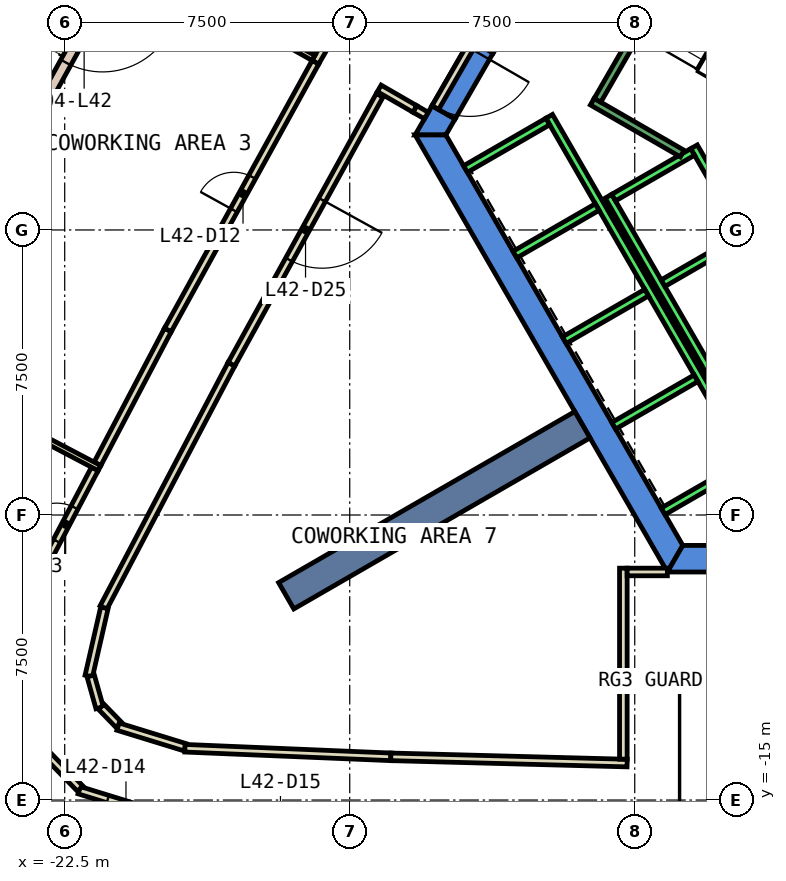
"""IFC4 building model, lengths in metres.
Left out: names, types, materials, properties, quantities, classifications, styles, units other than length and angle.
Written with IfcOpenShell. Run it as: python <this file> out.ifc"""

import sys

from ifc_helpers import new_model, si_unit, direction, frame, frame_2d, origin, place, context, subcontext, project, spatial, polyline, rectangle, outline, extrude, element, fill, save


model = new_model("IFC4")
c1 = context("Model", 3, precision=1e-05, world=origin(), true_north=direction((0.0, 1.0)))
c2 = subcontext(c1, "Body", "Model", "MODEL_VIEW")
j1 = project(units=[si_unit("LENGTHUNIT", "METRE"), si_unit("PLANEANGLEUNIT", "RADIAN")], contexts=[c1])
p1 = place(None, origin())
s1 = spatial("IfcSite", under=j1, at=p1, CompositionType="ELEMENT")
p2 = place(p1, origin())
s2 = spatial("IfcBuilding", under=s1, at=p2, CompositionType="ELEMENT")
p3 = place(p2, frame((0.0, 0.0, 189.8)))
s3 = spatial("IfcBuildingStorey", under=s2, at=p3, CompositionType="ELEMENT", Elevation=189.8)
p4 = place(p3, frame((0.0, 0.0, -0.6)))
e1 = element("IfcWall", 1, at=p4, inside=s3, PredefinedType="SHEAR", context=c2, shape_type="SweptSolid", body=[
    extrude(outline(polyline([(-11.834, 5.002), (-11.228, 4.652), (-6.235, 13.3), (-6.64, 14.0), (-11.834, 5.002)])), origin(), (0.0, 0.0, 1.0), 4.4),
])
p5 = place(p3, frame((0.0, 0.0, -0.6)))
e2 = element("IfcWall", 2, at=p5, inside=s3, PredefinedType="SHEAR", context=c2, shape_type="SweptSolid", body=[
    extrude(outline(polyline([(-12.228, 2.92), (-12.834, 3.27), (-13.279, 2.5), (-12.471, 2.5), (-12.228, 2.92)])), origin(), (0.0, 0.0, 1.0), 4.4),
])
p6 = place(p3, frame((0.0, 0.0, 3.6)))
e3 = element("IfcWall", 3, at=p6, inside=s3, PredefinedType="SHEAR", context=c2, shape_type="SweptSolid", body=[
    extrude(outline(polyline([(-12.834, 3.27), (-12.228, 2.92), (-11.228, 4.652), (-11.834, 5.002), (-12.834, 3.27)])), origin(), (0.0, 0.0, 1.0), 0.2),
])
p7 = place(p3, frame((0.0, 0.0, -0.6)))
e4 = element("IfcWall", 4, at=p7, inside=s3, PredefinedType="SHEAR", context=c2, shape_type="SweptSolid", body=[
    extrude(outline(polyline([(-13.279, 2.5), (-6.64, -9.0), (-6.235, -8.3), (-12.471, 2.5), (-13.279, 2.5)])), origin(), (0.0, 0.0, 1.0), 4.4),
])
p8 = place(p3, frame((0.0, 0.0, -0.6)))
e5 = element("IfcWall", 5, at=p8, inside=s3, PredefinedType="SHEAR", context=c2, shape_type="SweptSolid", body=[
    extrude(outline(polyline([(3.75, -9.0), (3.75, -8.3), (-6.235, -8.3), (-6.64, -9.0), (3.75, -9.0)])), origin(), (0.0, 0.0, 1.0), 4.4),
])
p9 = place(p3, frame((-8.877, -5.125, -0.6), z_axis=(0.0, 0.0, 1.0), x_axis=(-0.866017533419, -0.500013631625, 0.0)))
e6 = element("IfcWall", 6, at=p9, inside=s3, PredefinedType="SHEAR", context=c2, shape_type="SweptSolid", body=[
    extrude(rectangle(XDim=9.0, YDim=0.8, at=frame_2d((4.5, 0.0))), origin(), (0.0, 0.0, 1.0), 4.4),
])
p10 = place(p3, frame((-21.116, 6.865, 0.0), z_axis=(0.0, 0.0, 1.0), x_axis=(-0.482862185961, -0.875696356832, 0.0)))
e7 = element("IfcWall", 7, at=p10, inside=s3, PredefinedType="STANDARD", context=c2, shape_type="SweptSolid", body=[
    extrude(rectangle(XDim=7.23, YDim=0.3, at=frame_2d((3.615, 0.0))), origin(), (0.0, 0.0, 1.0), 3.8),
])
p11 = place(p10, frame((0.807, 0.0, 0.0)))
e8 = element("IfcOpeningElement", 8, at=p11, cuts=e7, PredefinedType="OPENING", context=c2, shape_type="SweptSolid", body=[
    extrude(rectangle(XDim=2.0, YDim=2.4, at=frame_2d((1.0, 1.2))), frame((0.0, 0.16, 0.0), z_axis=(0.0, -1.0, 0.0), x_axis=(1.0, 0.0, 0.0)), (0.0, 0.0, 1.0), 0.32),
])
p12 = place(p10, frame((4.222, 0.0, 0.9)))
e9 = element("IfcOpeningElement", 9, at=p12, cuts=e7, PredefinedType="OPENING", context=c2, shape_type="SweptSolid", body=[
    extrude(rectangle(XDim=2.4, YDim=2.6, at=frame_2d((1.2, 1.3))), frame((0.0, 0.16, 0.0), z_axis=(0.0, -1.0, 0.0), x_axis=(1.0, 0.0, 0.0)), (0.0, 0.0, 1.0), 0.32),
])
p13 = place(p3, frame((-18.112, -3.531, 0.0), z_axis=(0.0, 0.0, 1.0), x_axis=(-0.465461327558, -0.885068219149, 0.0)))
e10 = element("IfcWall", 10, at=p13, inside=s3, PredefinedType="PARTITIONING", context=c2, shape_type="SweptSolid", body=[
    extrude(rectangle(XDim=7.236, YDim=0.2, at=frame_2d((3.618, 0.0))), origin(), (0.0, 0.0, 1.0), 3.8),
])
p14 = place(p3, frame((-21.456, -9.944, 0.0), z_axis=(0.0, 0.0, 1.0), x_axis=(-0.222871656966, -0.974847795567, 0.0)))
e11 = element("IfcWall", 11, at=p14, inside=s3, PredefinedType="PARTITIONING", context=c2, shape_type="SweptSolid", body=[
    extrude(rectangle(XDim=1.839, YDim=0.2, at=frame_2d((0.919, 0.0))), origin(), (0.0, 0.0, 1.0), 3.8),
])
p15 = place(p3, frame((-21.816, -11.735, 0.0), z_axis=(0.0, 0.0, 1.0), x_axis=(0.270192443589, -0.962806337447, 0.0)))
e12 = element("IfcWall", 12, at=p15, inside=s3, PredefinedType="PARTITIONING", context=c2, shape_type="SweptSolid", body=[
    extrude(rectangle(XDim=0.869, YDim=0.2, at=frame_2d((0.435, 0.0))), origin(), (0.0, 0.0, 1.0), 3.8),
])
p16 = place(p3, frame((-21.538, -12.547, 0.0), z_axis=(0.0, 0.0, 1.0), x_axis=(0.697542638825, -0.716543276446, 0.0)))
e13 = element("IfcWall", 13, at=p16, inside=s3, PredefinedType="PARTITIONING", context=c2, shape_type="SweptSolid", body=[
    extrude(rectangle(XDim=0.668, YDim=0.2, at=frame_2d((0.334, 0.0))), origin(), (0.0, 0.0, 1.0), 3.8),
])
p17 = place(p3, frame((-21.097, -13.068, 0.0), z_axis=(0.0, 0.0, 1.0), x_axis=(0.955790442908, -0.294048685161, 0.0)))
e14 = element("IfcWall", 14, at=p17, inside=s3, PredefinedType="PARTITIONING", context=c2, shape_type="SweptSolid", body=[
    extrude(rectangle(XDim=1.846, YDim=0.2, at=frame_2d((0.923, 0.0))), origin(), (0.0, 0.0, 1.0), 3.8),
])
p18 = place(p3, frame((-19.336, -13.637, 0.0), z_axis=(0.0, 0.0, 1.0), x_axis=(0.999130261307, -0.041697972867, 0.0)))
e15 = element("IfcWall", 15, at=p18, inside=s3, PredefinedType="PARTITIONING", context=c2, shape_type="SweptSolid", body=[
    extrude(rectangle(XDim=5.422, YDim=0.2, at=frame_2d((2.711, 0.0))), origin(), (0.0, 0.0, 1.0), 3.8),
])
p19 = place(p3, frame((-13.919, -13.863, 0.0), z_axis=(0.0, 0.0, 1.0), x_axis=(0.999652206272, -0.026371698764, 0.0)))
e16 = element("IfcWall", 16, at=p19, inside=s3, PredefinedType="PARTITIONING", context=c2, shape_type="SweptSolid", body=[
    extrude(rectangle(XDim=6.221, YDim=0.2, at=frame_2d((3.111, 0.0))), origin(), (0.0, 0.0, 1.0), 3.8),
])
p20 = place(p3, frame((-12.984, 3.01, 0.0), z_axis=(0.0, 0.0, 1.0), x_axis=(-0.866046247233, 0.49996389635, 0.0)))
e17 = element("IfcWall", 17, at=p20, inside=s3, PredefinedType="PARTITIONING", context=c2, shape_type="SweptSolid", body=[
    extrude(rectangle(XDim=0.35, YDim=0.2, at=frame_2d((0.175, 0.0))), origin(), (0.0, 0.0, 1.0), 2.4),
])
p21 = place(p3, frame((-14.213, 3.543, 0.0), z_axis=(0.0, 0.0, 1.0), x_axis=(-0.482724934882, -0.875772023556, 0.0)))
e18 = element("IfcWall", 18, at=p21, inside=s3, PredefinedType="PARTITIONING", context=c2, shape_type="SweptSolid", body=[
    extrude(rectangle(XDim=8.077, YDim=0.2, at=frame_2d((4.039, 0.0))), origin(), (0.0, 0.0, 1.0), 3.8),
])
p22 = place(p21, frame((3.139, 0.0, 0.0)))
e19 = element("IfcOpeningElement", 19, at=p22, cuts=e18, PredefinedType="OPENING", context=c2, shape_type="SweptSolid", body=[
    extrude(rectangle(XDim=1.8, YDim=2.1, at=frame_2d((0.9, 1.05))), frame((0.0, 0.11, 0.0), z_axis=(0.0, -1.0, 0.0), x_axis=(1.0, 0.0, 0.0)), (0.0, 0.0, 1.0), 0.22),
])
p23 = place(p3, frame((-15.905, 4.412, 0.0), z_axis=(0.0, 0.0, 1.0), x_axis=(0.5000098125, 0.866019738461, 0.0)))
e20 = element("IfcWall", 20, at=p23, inside=s3, PredefinedType="PARTITIONING", context=c2, shape_type="SweptSolid", body=[
    extrude(rectangle(XDim=8.188, YDim=0.2, at=frame_2d((4.094, 0.0))), origin(), (0.0, 0.0, 1.0), 3.8),
])
p24 = place(p23, frame((3.594, 0.0, 0.0)))
e21 = element("IfcOpeningElement", 21, at=p24, cuts=e20, PredefinedType="OPENING", context=c2, shape_type="SweptSolid", body=[
    extrude(rectangle(XDim=1.0, YDim=2.1, at=frame_2d((0.5, 1.05))), frame((0.0, 0.11, 0.0), z_axis=(0.0, -1.0, 0.0), x_axis=(1.0, 0.0, 0.0)), (0.0, 0.0, 1.0), 0.22),
])
p25 = place(p3, frame((-21.638, -6.154, 0.0), z_axis=(0.0, 0.0, 1.0), x_axis=(0.465392595139, 0.885104362428, 0.0)))
e22 = element("IfcWall", 22, at=p25, inside=s3, PredefinedType="PARTITIONING", context=c2, shape_type="SweptSolid", body=[
    extrude(rectangle(XDim=3.982, YDim=0.2, at=frame_2d((1.991, 0.0))), origin(), (0.0, 0.0, 1.0), 3.8),
])
p26 = place(p3, frame((-19.785, -2.63, 0.0), z_axis=(0.0, 0.0, 1.0), x_axis=(0.482817232578, 0.875721142788, 0.0)))
e23 = element("IfcWall", 23, at=p26, inside=s3, PredefinedType="PARTITIONING", context=c2, shape_type="SweptSolid", body=[
    extrude(rectangle(XDim=8.04, YDim=0.2, at=frame_2d((4.02, 0.0))), origin(), (0.0, 0.0, 1.0), 3.8),
])
p27 = place(p26, frame((3.595, 0.0, 0.0)))
e24 = element("IfcOpeningElement", 24, at=p27, cuts=e23, PredefinedType="OPENING", context=c2, shape_type="SweptSolid", body=[
    extrude(rectangle(XDim=1.0, YDim=2.1, at=frame_2d((0.5, 1.05))), frame((0.0, 0.11, 0.0), z_axis=(0.0, -1.0, 0.0), x_axis=(1.0, 0.0, 0.0)), (0.0, 0.0, 1.0), 0.22),
])
p28 = place(p3, frame((-23.242, -9.204, 0.0), z_axis=(0.0, 0.0, 1.0), x_axis=(0.465431933571, 0.885083676955, 0.0)))
e25 = element("IfcWall", 25, at=p28, inside=s3, PredefinedType="PARTITIONING", context=c2, shape_type="SweptSolid", body=[
    extrude(rectangle(XDim=3.296, YDim=0.2, at=frame_2d((1.648, 0.0))), origin(), (0.0, 0.0, 1.0), 3.8),
])
p29 = place(p28, frame((1.148, 0.0, 0.0)))
e26 = element("IfcOpeningElement", 26, at=p29, cuts=e25, PredefinedType="OPENING", context=c2, shape_type="SweptSolid", body=[
    extrude(rectangle(XDim=1.0, YDim=2.1, at=frame_2d((0.5, 1.05))), frame((0.0, 0.11, 0.0), z_axis=(0.0, -1.0, 0.0), x_axis=(1.0, 0.0, 0.0)), (0.0, 0.0, 1.0), 0.22),
])
p30 = place(p3, frame((-19.657, -15.5, 0.0), z_axis=(0.0, 0.0, 1.0), x_axis=(-0.955612889251, 0.294625195625, 0.0)))
e27 = element("IfcWall", 27, at=p30, inside=s3, PredefinedType="PARTITIONING", context=c2, shape_type="SweptSolid", body=[
    extrude(rectangle(XDim=2.576, YDim=0.2, at=frame_2d((1.288, 0.0))), origin(), (0.0, 0.0, 1.0), 3.8),
])
p31 = place(p30, frame((0.788, 0.0, 0.0)))
e28 = element("IfcOpeningElement", 28, at=p31, cuts=e27, PredefinedType="OPENING", context=c2, shape_type="SweptSolid", body=[
    extrude(rectangle(XDim=1.0, YDim=2.1, at=frame_2d((0.5, 1.05))), frame((0.0, 0.11, 0.0), z_axis=(0.0, -1.0, 0.0), x_axis=(1.0, 0.0, 0.0)), (0.0, 0.0, 1.0), 0.22),
])
p32 = place(p3, frame((-22.093, -14.699, 0.0), z_axis=(0.0, 0.0, 1.0), x_axis=(-0.698551276451, 0.715560000397, 0.0)))
e29 = element("IfcWall", 29, at=p32, inside=s3, PredefinedType="PARTITIONING", context=c2, shape_type="SweptSolid", body=[
    extrude(rectangle(XDim=1.636, YDim=0.2, at=frame_2d((0.818, 0.0))), origin(), (0.0, 0.0, 1.0), 3.8),
])
p33 = place(p3, frame((-7.8, -13.924, 0.0), z_axis=(0.0, 0.0, 1.0), x_axis=(0.0, 1.0, 0.0)))
e30 = element("IfcWall", 30, at=p33, inside=s3, PredefinedType="PARTITIONING", context=c2, shape_type="SweptSolid", body=[
    extrude(rectangle(XDim=5.025, YDim=0.2, at=frame_2d((2.513, 0.0))), origin(), (0.0, 0.0, 1.0), 3.8),
])
p34 = place(p3, frame((-7.7, -8.999, 0.0), z_axis=(0.0, 0.0, 1.0), x_axis=(1.0, 0.0, 0.0)))
e31 = element("IfcWall", 31, at=p34, inside=s3, PredefinedType="PARTITIONING", context=c2, shape_type="SweptSolid", body=[
    extrude(rectangle(XDim=1.059, YDim=0.2, at=frame_2d((0.529, 0.0))), origin(), (0.0, 0.0, 1.0), 3.8),
])
p35 = place(p3, frame((-15.954, 4.526, 0.0), z_axis=(0.0, 0.0, 1.0), x_axis=(-0.870940016277, 0.491389344663, 0.0)))
e32 = element("IfcWall", 32, at=p35, inside=s3, PredefinedType="PARTITIONING", context=c2, shape_type="SweptSolid", body=[
    extrude(rectangle(XDim=4.18, YDim=0.15, at=frame_2d((2.09, 0.0))), origin(), (0.0, 0.0, 1.0), 3.8),
])
p36 = place(p3, frame((-21.585, -6.267, 0.0), z_axis=(0.0, 0.0, 1.0), x_axis=(-0.885073333504, 0.465451602554, 0.0)))
e33 = element("IfcWall", 33, at=p36, inside=s3, PredefinedType="PARTITIONING", context=c2, shape_type="SweptSolid", body=[
    extrude(rectangle(XDim=5.7, YDim=0.15, at=frame_2d((2.85, 0.0))), origin(), (0.0, 0.0, 1.0), 3.8),
])
p37 = place(p3, frame((-11.747, 4.952, 0.0), z_axis=(0.0, 0.0, 1.0), x_axis=(-0.50002537861, -0.866010750942, 0.0)))
e34 = element("IfcWall", 34, at=p37, inside=s3, PredefinedType="PARTITIONING", context=c2, shape_type="SweptSolid", body=[
    extrude(rectangle(XDim=2.0, YDim=0.2, at=frame_2d((1.0, 0.0))), origin(), (0.0, 0.0, 1.0), 2.4),
])
p38 = place(p37, frame((0.19, 0.0, 0.0)))
e35 = element("IfcOpeningElement", 35, at=p38, cuts=e34, PredefinedType="OPENING", context=c2, shape_type="SweptSolid", body=[
    extrude(rectangle(XDim=1.8, YDim=2.1, at=frame_2d((0.9, 1.05))), frame((0.0, 0.11, 0.0), z_axis=(0.0, -1.0, 0.0), x_axis=(1.0, 0.0, 0.0)), (0.0, 0.0, 1.0), 0.22),
])
p39 = place(p3, frame((-13.287, 3.185, 0.0), z_axis=(0.0, 0.0, 1.0), x_axis=(-0.866121626761, 0.499833299868, 0.0)))
e36 = element("IfcWall", 36, at=p39, inside=s3, PredefinedType="PARTITIONING", context=c2, shape_type="SweptSolid", body=[
    extrude(rectangle(XDim=1.08, YDim=0.2, at=frame_2d((0.54, 0.0))), origin(), (0.0, 0.0, 1.0), 3.8),
])
p40 = place(p3, frame((-5.94, 2.188, 0.0), z_axis=(0.0, 0.0, 1.0), x_axis=(0.500034260056, -0.866005622828, 0.0)))
e37 = element("IfcWall", 37, at=p40, inside=s3, PredefinedType="STANDARD", context=c2, shape_type="SweptSolid", body=[
    extrude(rectangle(XDim=5.399, YDim=0.2, at=frame_2d((2.7, 0.0))), origin(), (0.0, 0.0, 1.0), 3.8),
])
p41 = place(p40, frame((3.075, 0.0, 0.0)))
e38 = element("IfcOpeningElement", 38, at=p41, cuts=e37, PredefinedType="OPENING", context=c2, shape_type="SweptSolid", body=[
    extrude(rectangle(XDim=1.1, YDim=2.1, at=frame_2d((0.55, 1.05))), frame((0.0, 0.11, 0.0), z_axis=(0.0, -1.0, 0.0), x_axis=(1.0, 0.0, 0.0)), (0.0, 0.0, 1.0), 0.22),
])
p42 = place(p40, frame((1.225, 0.0, 0.0)))
e39 = element("IfcOpeningElement", 39, at=p42, cuts=e37, PredefinedType="OPENING", context=c2, shape_type="SweptSolid", body=[
    extrude(rectangle(XDim=1.1, YDim=2.1, at=frame_2d((0.55, 1.05))), frame((0.0, 0.11, 0.0), z_axis=(0.0, -1.0, 0.0), x_axis=(1.0, 0.0, 0.0)), (0.0, 0.0, 1.0), 0.22),
])
p43 = place(p3, frame((-8.192, 0.888, 0.0), z_axis=(0.0, 0.0, 1.0), x_axis=(0.500034260056, -0.866005622828, 0.0)))
e40 = element("IfcWall", 40, at=p43, inside=s3, PredefinedType="STANDARD", context=c2, shape_type="SweptSolid", body=[
    extrude(rectangle(XDim=5.399, YDim=0.2, at=frame_2d((2.7, 0.0))), origin(), (0.0, 0.0, 1.0), 3.8),
])
for number, where, z_axis, x_axis in (
    (41, (-5.977, 2.052, 0.0), (0.0, 0.0, 1.0), (-0.866, -0.5, 0.0)),
    (42, (-4.677, -0.2, 0.0), (0.0, 0.0, 1.0), (-0.866, -0.5, 0.0)),
):
    element("IfcWall", number, at=place(p3, frame(where, z_axis=z_axis, x_axis=x_axis)), inside=s3, PredefinedType="STANDARD", context=c2, shape_type="SweptSolid", body=[
        extrude(rectangle(XDim=2.399, YDim=0.2, at=frame_2d((1.2, 0.0))), origin(), (0.0, 0.0, 1.0), 3.8),
    ])
p44 = place(p3, frame((-9.751, 2.99, 0.0), z_axis=(0.0, 0.0, 1.0), x_axis=(0.50000090737, -0.866024879913, 0.0)))
e43 = element("IfcWall", 43, at=p44, inside=s3, PredefinedType="STANDARD", context=c2, shape_type="SweptSolid", body=[
    extrude(rectangle(XDim=10.6, YDim=0.2, at=frame_2d((5.3, 0.0))), origin(), (0.0, 0.0, 1.0), 3.8),
])
p45 = place(p3, frame((-9.788, 2.853, 0.0), z_axis=(0.0, 0.0, 1.0), x_axis=(-0.865998541277, -0.500046524342, 0.0)))
e44 = element("IfcWall", 44, at=p45, inside=s3, PredefinedType="STANDARD", context=c2, shape_type="SweptSolid", body=[
    extrude(rectangle(XDim=2.5, YDim=0.2, at=frame_2d((1.25, 0.0))), origin(), (0.0, 0.0, 1.0), 3.8),
])
for number, where, z_axis, x_axis in (
    (45, (-8.488, 0.602, 0.0), (0.0, 0.0, 1.0), (-0.866, -0.5, 0.0)),
    (46, (-7.188, -1.65, 0.0), (0.0, 0.0, 1.0), (-0.866, -0.5, 0.0)),
    (47, (-5.888, -3.902, 0.0), (0.0, 0.0, 1.0), (-0.866, -0.5, 0.0)),
    (48, (-4.588, -6.153, 0.0), (0.0, 0.0, 1.0), (-0.866, -0.5, 0.0)),
):
    element("IfcWall", number, at=place(p3, frame(where, z_axis=z_axis, x_axis=x_axis)), inside=s3, PredefinedType="STANDARD", context=c2, shape_type="SweptSolid", body=[
        extrude(rectangle(XDim=2.5, YDim=0.2, at=frame_2d((1.25, 0.0))), origin(), (0.0, 0.0, 1.0), 3.8),
    ])
p46 = place(p3, frame((-6.25, 2.01, 0.0), z_axis=(0.0, 0.0, 1.0), x_axis=(-0.86611865017, 0.499838457731, 0.0)))
e49 = element("IfcWall", 49, at=p46, inside=s3, PredefinedType="STANDARD", context=c2, shape_type="SweptSolid", body=[
    extrude(rectangle(XDim=2.733, YDim=0.2, at=frame_2d((1.366, 0.0))), origin(), (0.0, 0.0, 1.0), 3.8),
])
p47 = place(p3, frame((-5.03, 9.388, 0.0), z_axis=(0.0, 0.0, 1.0), x_axis=(-0.499978703459, -0.866037698999, 0.0)))
e50 = element("IfcWall", 50, at=p47, inside=s3, PredefinedType="STANDARD", context=c2, shape_type="SweptSolid", body=[
    extrude(rectangle(XDim=6.9, YDim=0.2, at=frame_2d((3.45, 0.0))), origin(), (0.0, 0.0, 1.0), 3.8),
])
p48 = place(p11, origin())
e51 = element("IfcDoor", 51, at=p48, inside=s3, OperationType="SLIDING_TO_LEFT", PredefinedType="DOOR", context=c2, shape_type="SweptSolid", body=[
    extrude(rectangle(XDim=2.0, YDim=2.4, at=frame_2d((1.0, 1.2))), frame((0.0, 0.025, 0.0), z_axis=(0.0, -1.0, 0.0), x_axis=(1.0, 0.0, 0.0)), (0.0, 0.0, 1.0), 0.05),
])
fill(e8, e51)
p49 = place(p27, origin())
e52 = element("IfcDoor", 52, at=p49, inside=s3, OperationType="SINGLE_SWING_LEFT", PredefinedType="DOOR", context=c2, shape_type="SweptSolid", body=[
    extrude(rectangle(XDim=1.0, YDim=2.1, at=frame_2d((0.5, 1.05))), frame((0.0, 0.025, 0.0), z_axis=(0.0, -1.0, 0.0), x_axis=(1.0, 0.0, 0.0)), (0.0, 0.0, 1.0), 0.05),
])
fill(e24, e52)
p50 = place(p29, origin())
e53 = element("IfcDoor", 53, at=p50, inside=s3, OperationType="SINGLE_SWING_RIGHT", PredefinedType="DOOR", context=c2, shape_type="SweptSolid", body=[
    extrude(rectangle(XDim=1.0, YDim=2.1, at=frame_2d((0.5, 1.05))), frame((0.0, 0.025, 0.0), z_axis=(0.0, -1.0, 0.0), x_axis=(1.0, 0.0, 0.0)), (0.0, 0.0, 1.0), 0.05),
])
fill(e26, e53)
p51 = place(p31, origin())
e54 = element("IfcDoor", 54, at=p51, inside=s3, OperationType="SINGLE_SWING_LEFT", PredefinedType="DOOR", context=c2, shape_type="SweptSolid", body=[
    extrude(rectangle(XDim=1.0, YDim=2.1, at=frame_2d((0.5, 1.05))), frame((0.0, 0.025, 0.0), z_axis=(0.0, -1.0, 0.0), x_axis=(1.0, 0.0, 0.0)), (0.0, 0.0, 1.0), 0.05),
])
fill(e28, e54)
p52 = place(p22, origin())
e55 = element("IfcDoor", 55, at=p52, inside=s3, OperationType="DOUBLE_DOOR_SINGLE_SWING", PredefinedType="DOOR", context=c2, shape_type="SweptSolid", body=[
    extrude(rectangle(XDim=1.8, YDim=2.1, at=frame_2d((0.9, 1.05))), frame((0.0, 0.025, 0.0), z_axis=(0.0, -1.0, 0.0), x_axis=(1.0, 0.0, 0.0)), (0.0, 0.0, 1.0), 0.05),
])
fill(e19, e55)
p53 = place(p38, origin())
e56 = element("IfcDoor", 56, at=p53, inside=s3, OperationType="DOUBLE_DOOR_SINGLE_SWING", PredefinedType="DOOR", context=c2, shape_type="SweptSolid", body=[
    extrude(rectangle(XDim=1.8, YDim=2.1, at=frame_2d((0.9, 1.05))), frame((0.0, 0.025, 0.0), z_axis=(0.0, -1.0, 0.0), x_axis=(1.0, 0.0, 0.0)), (0.0, 0.0, 1.0), 0.05),
])
fill(e35, e56)
save(model, sys.argv[1])
